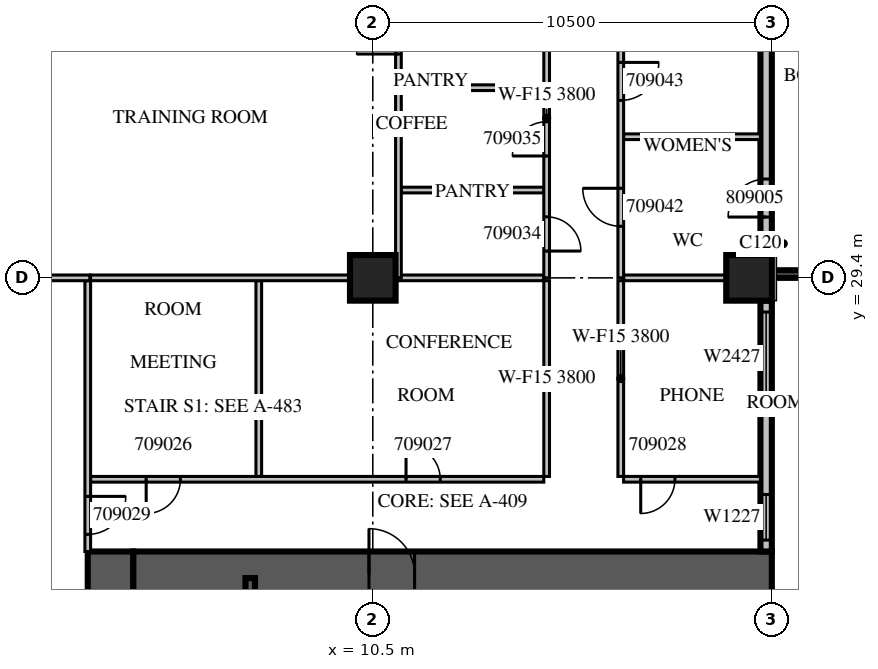
"""IFC4 building model, lengths in metres.
Left out: names, types, materials, properties, quantities, classifications, styles, units other than length and angle.
Written with IfcOpenShell. Run it as: python <this file> out.ifc"""

import sys

from ifc_helpers import new_model, si_unit, direction, frame, frame_2d, origin, origin_2d, place, context, subcontext, project, spatial, rectangle, extrude, source, transform, mapped, element, fill, save


model = new_model("IFC4")
c1 = context("Model", 3, precision=1e-05, world=origin(), true_north=direction((0.0, 1.0)))
c2 = subcontext(c1, "Body", "Model", "MODEL_VIEW")
j1 = project(units=[si_unit("LENGTHUNIT", "METRE"), si_unit("PLANEANGLEUNIT", "RADIAN")], contexts=[c1])
p1 = place(None, origin())
s1 = spatial("IfcSite", under=j1, at=p1, CompositionType="ELEMENT")
p2 = place(p1, origin())
s2 = spatial("IfcBuilding", under=s1, at=p2, CompositionType="ELEMENT")
p3 = place(p2, frame((0.0, 0.0, 48.9)))
s3 = spatial("IfcBuildingStorey", under=s2, at=p3, CompositionType="ELEMENT", Elevation=48.9)
m1 = source(origin(), c2, "Body", "SweptSolid", [
    extrude(rectangle(XDim=1.2, YDim=1.2, at=origin_2d()), origin(), (0.0, 0.0, 1.0), 4.2),
])
for number, where, z_axis, x_axis in (
    (1, (10.5, 29.4, 0.0), (0.0, 0.0, 1.0), (1.0, 0.0, 0.0)),
    (2, (20.4, 29.4, 0.0), (0.0, 0.0, 1.0), (1.0, 0.0, 0.0)),
):
    element("IfcColumn", number, at=place(p3, frame(where, z_axis=z_axis, x_axis=x_axis)), inside=s3, PredefinedType="COLUMN", context=c2, shape_type="MappedRepresentation", body=[
        mapped(m1, transform((0.0, 0.0, 0.0), scale=1.0)),
    ])
m2 = source(origin(), c2, "Body", "SweptSolid", [
    extrude(rectangle(XDim=18.0, YDim=1.2, at=frame_2d((9.0, 0.0))), origin(), (0.0, 0.0, 1.0), 4.2),
])
p4 = place(p3, frame((3.6, 4.2, 0.0), z_axis=(0.0, 0.0, 1.0), x_axis=(0.0, 1.0, 0.0)))
e3 = element("IfcWall", 3, at=p4, inside=s3, PredefinedType="SHEAR", context=c2, shape_type="MappedRepresentation", body=[
    mapped(m2, transform((0.0, 0.0, 0.0), scale=1.0)),
])
m3 = source(origin(), c2, "Body", "SweptSolid", [
    extrude(rectangle(XDim=2.2, YDim=2.1, at=frame_2d((1.1, 1.05))), frame((0.0, 0.61, 0.0), z_axis=(0.0, -1.0, 0.0), x_axis=(1.0, 0.0, 0.0)), (0.0, 0.0, 1.0), 1.22),
])
p5 = place(p4, frame((4.2, 0.0, 0.0)))
e4 = element("IfcOpeningElement", 4, at=p5, cuts=e3, PredefinedType="OPENING", context=c2, shape_type="MappedRepresentation", body=[
    mapped(m3, transform((0.0, 0.0, 0.0), scale=1.0)),
])
m4 = source(origin(), c2, "Body", "SweptSolid", [
    extrude(rectangle(XDim=16.8, YDim=1.2, at=frame_2d((8.4, 0.0))), origin(), (0.0, 0.0, 1.0), 4.2),
])
p6 = place(p3, frame((4.2, 21.6, 0.0), z_axis=(0.0, 0.0, 1.0), x_axis=(1.0, 0.0, 0.0)))
e5 = element("IfcWall", 5, at=p6, inside=s3, PredefinedType="SHEAR", context=c2, shape_type="MappedRepresentation", body=[
    mapped(m4, transform((0.0, 0.0, 0.0), scale=1.0)),
])
m5 = source(origin(), c2, "Body", "SweptSolid", [
    extrude(rectangle(XDim=1.2, YDim=2.1, at=frame_2d((0.6, 1.05))), frame((0.0, 0.61, 0.0), z_axis=(0.0, -1.0, 0.0), x_axis=(1.0, 0.0, 0.0)), (0.0, 0.0, 1.0), 1.22),
])
p7 = place(p6, frame((6.2, 0.0, 0.0)))
e6 = element("IfcOpeningElement", 6, at=p7, cuts=e5, PredefinedType="OPENING", context=c2, shape_type="MappedRepresentation", body=[
    mapped(m5, transform((0.0, 0.0, 0.0), scale=1.0)),
])
m6 = source(origin(), c2, "Body", "SweptSolid", [
    extrude(rectangle(XDim=6.6, YDim=0.3, at=frame_2d((3.3, 0.0))), origin(), (0.0, 0.0, 1.0), 3.8),
])
p8 = place(p3, frame((20.85, 22.2, 0.0), z_axis=(0.0, 0.0, 1.0), x_axis=(0.0, 1.0, 0.0)))
e7 = element("IfcWall", 7, at=p8, inside=s3, PredefinedType="STANDARD", context=c2, shape_type="MappedRepresentation", body=[
    mapped(m6, transform((0.0, 0.0, 0.0), scale=1.0)),
])
m7 = source(origin(), c2, "Body", "SweptSolid", [
    extrude(rectangle(XDim=1.2, YDim=2.7, at=frame_2d((0.6, 1.35))), frame((0.0, 0.16, 0.0), z_axis=(0.0, -1.0, 0.0), x_axis=(1.0, 0.0, 0.0)), (0.0, 0.0, 1.0), 0.32),
])
p9 = place(p8, frame((0.3, 0.0, 0.6)))
e8 = element("IfcOpeningElement", 8, at=p9, cuts=e7, PredefinedType="OPENING", context=c2, shape_type="MappedRepresentation", body=[
    mapped(m7, transform((0.0, 0.0, 0.0), scale=1.0)),
])
m8 = source(origin(), c2, "Body", "SweptSolid", [
    extrude(rectangle(XDim=2.4, YDim=2.7, at=frame_2d((1.2, 1.35))), frame((0.0, 0.16, 0.0), z_axis=(0.0, -1.0, 0.0), x_axis=(1.0, 0.0, 0.0)), (0.0, 0.0, 1.0), 0.32),
])
p10 = place(p8, frame((3.9, 0.0, 0.6)))
e9 = element("IfcOpeningElement", 9, at=p10, cuts=e7, PredefinedType="OPENING", context=c2, shape_type="MappedRepresentation", body=[
    mapped(m8, transform((0.0, 0.0, 0.0), scale=1.0)),
])
m9 = source(origin(), c2, "Body", "SweptSolid", [
    extrude(rectangle(XDim=7.2, YDim=0.3, at=frame_2d((3.6, 0.0))), origin(), (0.0, 0.0, 1.0), 3.8),
])
p11 = place(p3, frame((20.85, 30.0, 0.0), z_axis=(0.0, 0.0, 1.0), x_axis=(0.0, 1.0, 0.0)))
e10 = element("IfcWall", 10, at=p11, inside=s3, PredefinedType="STANDARD", context=c2, shape_type="MappedRepresentation", body=[
    mapped(m9, transform((0.0, 0.0, 0.0), scale=1.0)),
])
m10 = source(origin(), c2, "Body", "SweptSolid", [
    extrude(rectangle(XDim=1.0, YDim=2.1, at=frame_2d((0.5, 1.05))), frame((0.0, 0.16, 0.0), z_axis=(0.0, -1.0, 0.0), x_axis=(1.0, 0.0, 0.0)), (0.0, 0.0, 1.0), 0.32),
])
p12 = place(p11, frame((1.0, 0.0, 0.0)))
e11 = element("IfcOpeningElement", 11, at=p12, cuts=e10, PredefinedType="OPENING", context=c2, shape_type="MappedRepresentation", body=[
    mapped(m10, transform((0.0, 0.0, 0.0), scale=1.0)),
])
m11 = source(origin(), c2, "Body", "SweptSolid", [
    extrude(rectangle(XDim=3.9, YDim=0.2, at=frame_2d((1.95, 0.0))), origin(), (0.0, 0.0, 1.0), 3.79),
])
p13 = place(p3, frame((21.0, 29.5, 0.0), z_axis=(0.0, 0.0, 1.0), x_axis=(1.0, 0.0, 0.0)))
e12 = element("IfcWall", 12, at=p13, inside=s3, PredefinedType="SOLIDWALL", context=c2, shape_type="MappedRepresentation", body=[
    mapped(m11, transform((0.0, 0.0, 0.0), scale=1.0)),
])
m12 = source(origin(), c2, "Body", "SweptSolid", [
    extrude(rectangle(XDim=2.4, YDim=2.7, at=frame_2d((1.2, 1.35))), frame((0.0, 0.11, 0.0), z_axis=(0.0, -1.0, 0.0), x_axis=(1.0, 0.0, 0.0)), (0.0, 0.0, 1.0), 0.22),
])
p14 = place(p13, frame((0.75, 0.0, 0.6)))
e13 = element("IfcOpeningElement", 13, at=p14, cuts=e12, PredefinedType="OPENING", context=c2, shape_type="MappedRepresentation", body=[
    mapped(m12, transform((0.0, 0.0, 0.0), scale=1.0)),
])
m13 = source(origin(), c2, "Body", "SweptSolid", [
    extrude(rectangle(XDim=6.6, YDim=0.25, at=frame_2d((3.3, 0.0))), origin(), (0.0, 0.0, 1.0), 3.8),
])
p15 = place(p3, frame((7.275, 14.9, 0.0), z_axis=(0.0, 0.0, 1.0), x_axis=(0.0, 1.0, 0.0)))
e14 = element("IfcWall", 14, at=p15, inside=s3, PredefinedType="SOLIDWALL", context=c2, shape_type="MappedRepresentation", body=[
    mapped(m13, transform((0.0, 0.0, 0.0), scale=1.0)),
])
m14 = source(origin(), c2, "Body", "SweptSolid", [
    extrude(rectangle(XDim=1.1, YDim=2.1, at=frame_2d((0.55, 1.05))), frame((0.0, 0.135, 0.0), z_axis=(0.0, -1.0, 0.0), x_axis=(1.0, 0.0, 0.0)), (0.0, 0.0, 1.0), 0.27),
])
p16 = place(p15, frame((0.15, 0.0, 0.0)))
e15 = element("IfcOpeningElement", 15, at=p16, cuts=e14, PredefinedType="OPENING", context=c2, shape_type="MappedRepresentation", body=[
    mapped(m14, transform((0.0, 0.0, 0.0), scale=1.0)),
])
m15 = source(origin(), c2, "Body", "SweptSolid", [
    extrude(rectangle(XDim=11.925, YDim=0.15, at=frame_2d((5.963, 0.0))), origin(), (0.0, 0.0, 1.0), 3.8),
])
p17 = place(p3, frame((3.075, 24.1, 0.0), z_axis=(0.0, 0.0, 1.0), x_axis=(1.0, 0.0, 0.0)))
e16 = element("IfcWall", 16, at=p17, inside=s3, PredefinedType="PARTITIONING", context=c2, shape_type="MappedRepresentation", body=[
    mapped(m15, transform((0.0, 0.0, 0.0), scale=1.0)),
])
m16 = source(origin(), c2, "Body", "SweptSolid", [
    extrude(rectangle(XDim=0.9, YDim=2.1, at=frame_2d((0.45, 1.05))), frame((0.0, 0.085, 0.0), z_axis=(0.0, -1.0, 0.0), x_axis=(1.0, 0.0, 0.0)), (0.0, 0.0, 1.0), 0.17),
])
p18 = place(p17, frame((1.462, 0.0, 0.0)))
e17 = element("IfcOpeningElement", 17, at=p18, cuts=e16, PredefinedType="OPENING", context=c2, shape_type="MappedRepresentation", body=[
    mapped(m16, transform((0.0, 0.0, 0.0), scale=1.0)),
])
p19 = place(p17, frame((8.3, 0.0, 0.0)))
e18 = element("IfcOpeningElement", 18, at=p19, cuts=e16, PredefinedType="OPENING", context=c2, shape_type="MappedRepresentation", body=[
    mapped(m16, transform((0.0, 0.0, 0.0), scale=1.0)),
])
m17 = source(origin(), c2, "Body", "SweptSolid", [
    extrude(rectangle(XDim=3.6, YDim=0.15, at=frame_2d((1.8, 0.0))), origin(), (0.0, 0.0, 1.0), 3.8),
])
p20 = place(p3, frame((17.1, 24.1, 0.0), z_axis=(0.0, 0.0, 1.0), x_axis=(1.0, 0.0, 0.0)))
e19 = element("IfcWall", 19, at=p20, inside=s3, PredefinedType="PARTITIONING", context=c2, shape_type="MappedRepresentation", body=[
    mapped(m17, transform((0.0, 0.0, 0.0), scale=1.0)),
])
p21 = place(p20, frame((0.45, 0.0, 0.0)))
e20 = element("IfcOpeningElement", 20, at=p21, cuts=e19, PredefinedType="OPENING", context=c2, shape_type="MappedRepresentation", body=[
    mapped(m16, transform((0.0, 0.0, 0.0), scale=1.0)),
])
m18 = source(origin(), c2, "Body", "SweptSolid", [
    extrude(rectangle(XDim=5.15, YDim=0.15, at=frame_2d((2.575, 0.0))), origin(), (0.0, 0.0, 1.0), 3.8),
])
for number, where, z_axis, x_axis in (
    (21, (7.5, 24.175, 0.0), (0.0, 0.0, 1.0), (0.0, 1.0, 0.0)),
    (22, (15.075, 24.175, 0.0), (0.0, 0.0, 1.0), (0.0, 1.0, 0.0)),
    (23, (17.025, 29.325, 0.0), (0.0, 0.0, 1.0), (0.0, -1.0, 0.0)),
):
    element("IfcWall", number, at=place(p3, frame(where, z_axis=z_axis, x_axis=x_axis)), inside=s3, PredefinedType="PARTITIONING", context=c2, shape_type="MappedRepresentation", body=[
        mapped(m18, transform((0.0, 0.0, 0.0), scale=1.0)),
    ])
m19 = source(origin(), c2, "Body", "SweptSolid", [
    extrude(rectangle(XDim=6.826, YDim=0.15, at=frame_2d((3.413, 0.0))), origin(), (0.0, 0.0, 1.0), 3.8),
])
p22 = place(p3, frame((9.901, 29.4, 0.0), z_axis=(0.0, 0.0, 1.0), x_axis=(-1.0, 0.0, 0.0)))
e24 = element("IfcWall", 24, at=p22, inside=s3, PredefinedType="PARTITIONING", context=c2, shape_type="MappedRepresentation", body=[
    mapped(m19, transform((0.0, 0.0, 0.0), scale=1.0)),
])
m20 = source(origin(), c2, "Body", "SweptSolid", [
    extrude(rectangle(XDim=3.901, YDim=0.15, at=frame_2d((1.95, 0.0))), origin(), (0.0, 0.0, 1.0), 3.8),
])
p23 = place(p3, frame((15.0, 29.4, 0.0), z_axis=(0.0, 0.0, 1.0), x_axis=(-1.0, 0.0, 0.0)))
e25 = element("IfcWall", 25, at=p23, inside=s3, PredefinedType="PARTITIONING", context=c2, shape_type="MappedRepresentation", body=[
    mapped(m20, transform((0.0, 0.0, 0.0), scale=1.0)),
])
m21 = source(origin(), c2, "Body", "SweptSolid", [
    extrude(rectangle(XDim=2.701, YDim=0.15, at=frame_2d((1.351, 0.0))), origin(), (0.0, 0.0, 1.0), 3.8),
])
p24 = place(p3, frame((19.801, 29.4, 0.0), z_axis=(0.0, 0.0, 1.0), x_axis=(-1.0, 0.0, 0.0)))
e26 = element("IfcWall", 26, at=p24, inside=s3, PredefinedType="PARTITIONING", context=c2, shape_type="MappedRepresentation", body=[
    mapped(m21, transform((0.0, 0.0, 0.0), scale=1.0)),
])
m22 = source(origin(), c2, "Body", "SweptSolid", [
    extrude(rectangle(XDim=7.125, YDim=0.15, at=frame_2d((3.562, 0.0))), origin(), (0.0, 0.0, 1.0), 3.8),
])
p25 = place(p3, frame((3.0, 29.325, 0.0), z_axis=(0.0, 0.0, 1.0), x_axis=(0.0, -1.0, 0.0)))
e27 = element("IfcWall", 27, at=p25, inside=s3, PredefinedType="PARTITIONING", context=c2, shape_type="MappedRepresentation", body=[
    mapped(m22, transform((0.0, 0.0, 0.0), scale=1.0)),
])
m23 = source(origin(), c2, "Body", "SweptSolid", [
    extrude(rectangle(XDim=1.0, YDim=2.1, at=frame_2d((0.5, 1.05))), frame((0.0, 0.085, 0.0), z_axis=(0.0, -1.0, 0.0), x_axis=(1.0, 0.0, 0.0)), (0.0, 0.0, 1.0), 0.17),
])
p26 = place(p25, frame((5.675, 0.0, 0.0)))
e28 = element("IfcOpeningElement", 28, at=p26, cuts=e27, PredefinedType="OPENING", context=c2, shape_type="MappedRepresentation", body=[
    mapped(m23, transform((0.0, 0.0, 0.0), scale=1.0)),
])
m24 = source(origin(), c2, "Body", "SweptSolid", [
    extrude(rectangle(XDim=3.75, YDim=0.15, at=frame_2d((1.875, 0.0))), origin(), (0.0, 0.0, 1.0), 3.8),
])
for number, where, z_axis, x_axis in (
    (29, (15.0, 31.71, 0.0), (0.0, 0.0, 1.0), (-1.0, 0.0, 0.0)),
    (30, (15.0, 34.403, 0.0), (0.0, 0.0, 1.0), (-1.0, 0.0, 0.0)),
):
    element("IfcWall", number, at=place(p3, frame(where, z_axis=z_axis, x_axis=x_axis)), inside=s3, PredefinedType="PARTITIONING", context=c2, shape_type="MappedRepresentation", body=[
        mapped(m24, transform((0.0, 0.0, 0.0), scale=1.0)),
    ])
m25 = source(origin(), c2, "Body", "SweptSolid", [
    extrude(rectangle(XDim=1.856, YDim=0.15, at=frame_2d((0.928, 0.0))), origin(), (0.0, 0.0, 1.0), 3.8),
])
p27 = place(p3, frame((3.055, 29.4, 0.0), z_axis=(0.0, 0.0, 1.0), x_axis=(-1.0, 0.0, 0.0)))
e31 = element("IfcWall", 31, at=p27, inside=s3, PredefinedType="PARTITIONING", context=c2, shape_type="MappedRepresentation", body=[
    mapped(m25, transform((0.0, 0.0, 0.0), scale=1.0)),
])
m26 = source(origin(), c2, "Body", "SweptSolid", [
    extrude(rectangle(XDim=8.4, YDim=0.15, at=frame_2d((4.2, 0.0))), origin(), (0.0, 0.0, 1.0), 3.8),
])
p28 = place(p3, frame((11.175, 29.4, 0.0), z_axis=(0.0, 0.0, 1.0), x_axis=(0.0, 1.0, 0.0)))
e32 = element("IfcWall", 32, at=p28, inside=s3, PredefinedType="PARTITIONING", context=c2, shape_type="MappedRepresentation", body=[
    mapped(m26, transform((0.0, 0.0, 0.0), scale=1.0)),
])
m27 = source(origin(), c2, "Body", "SweptSolid", [
    extrude(rectangle(XDim=1.1, YDim=2.1, at=frame_2d((0.55, 1.05))), frame((0.0, 0.085, 0.0), z_axis=(0.0, -1.0, 0.0), x_axis=(1.0, 0.0, 0.0)), (0.0, 0.0, 1.0), 0.17),
])
p29 = place(p28, frame((5.889, 0.0, 0.0)))
e33 = element("IfcOpeningElement", 33, at=p29, cuts=e32, PredefinedType="OPENING", context=c2, shape_type="MappedRepresentation", body=[
    mapped(m27, transform((0.0, 0.0, 0.0), scale=1.0)),
])
p30 = place(p3, frame((17.1, 33.113, 0.0), z_axis=(0.0, 0.0, 1.0), x_axis=(1.0, 0.0, 0.0)))
e34 = element("IfcWall", 34, at=p30, inside=s3, PredefinedType="PARTITIONING", context=c2, shape_type="MappedRepresentation", body=[
    mapped(m17, transform((0.0, 0.0, 0.0), scale=1.0)),
])
p31 = place(p3, frame((15.075, 29.4, 0.0), z_axis=(0.0, 0.0, 1.0), x_axis=(0.0, 1.0, 0.0)))
e35 = element("IfcWall", 35, at=p31, inside=s3, PredefinedType="PARTITIONING", context=c2, shape_type="MappedRepresentation", body=[
    mapped(m26, transform((0.0, 0.0, 0.0), scale=1.0)),
])
p32 = place(p31, frame((6.152, 0.0, 0.0)))
e36 = element("IfcOpeningElement", 36, at=p32, cuts=e35, PredefinedType="OPENING", context=c2, shape_type="MappedRepresentation", body=[
    mapped(m27, transform((0.0, 0.0, 0.0), scale=1.0)),
])
p33 = place(p31, frame((0.705, 0.0, 0.0)))
e37 = element("IfcOpeningElement", 37, at=p33, cuts=e35, PredefinedType="OPENING", context=c2, shape_type="MappedRepresentation", body=[
    mapped(m16, transform((0.0, 0.0, 0.0), scale=1.0)),
])
p34 = place(p31, frame((3.207, 0.0, 0.0)))
e38 = element("IfcOpeningElement", 38, at=p34, cuts=e35, PredefinedType="OPENING", context=c2, shape_type="MappedRepresentation", body=[
    mapped(m16, transform((0.0, 0.0, 0.0), scale=1.0)),
])
p35 = place(p3, frame((17.025, 61.02, 0.0), z_axis=(0.0, 0.0, 1.0), x_axis=(0.0, -1.0, 0.0)))
e39 = element("IfcWall", 39, at=p35, inside=s3, PredefinedType="PARTITIONING", context=c2, shape_type="SweptSolid", body=[
    extrude(rectangle(XDim=31.62, YDim=0.15, at=frame_2d((15.81, 0.0))), origin(), (0.0, 0.0, 1.0), 3.8),
])
p36 = place(p35, frame((29.263, 0.0, 0.0)))
e40 = element("IfcOpeningElement", 40, at=p36, cuts=e39, PredefinedType="OPENING", context=c2, shape_type="MappedRepresentation", body=[
    mapped(m23, transform((0.0, 0.0, 0.0), scale=1.0)),
])
p37 = place(p35, frame((25.951, 0.0, 0.0)))
e41 = element("IfcOpeningElement", 41, at=p37, cuts=e39, PredefinedType="OPENING", context=c2, shape_type="MappedRepresentation", body=[
    mapped(m23, transform((0.0, 0.0, 0.0), scale=1.0)),
])
p38 = place(p35, frame((23.608, 0.0, 0.0)))
e42 = element("IfcOpeningElement", 42, at=p38, cuts=e39, PredefinedType="OPENING", context=c2, shape_type="MappedRepresentation", body=[
    mapped(m23, transform((0.0, 0.0, 0.0), scale=1.0)),
])
p39 = place(p35, frame((20.863, 0.0, 0.0)))
e43 = element("IfcOpeningElement", 43, at=p39, cuts=e39, PredefinedType="OPENING", context=c2, shape_type="MappedRepresentation", body=[
    mapped(m23, transform((0.0, 0.0, 0.0), scale=1.0)),
])
p40 = place(p35, frame((17.551, 0.0, 0.0)))
e44 = element("IfcOpeningElement", 44, at=p40, cuts=e39, PredefinedType="OPENING", context=c2, shape_type="MappedRepresentation", body=[
    mapped(m23, transform((0.0, 0.0, 0.0), scale=1.0)),
])
p41 = place(p35, frame((15.208, 0.0, 0.0)))
e45 = element("IfcOpeningElement", 45, at=p41, cuts=e39, PredefinedType="OPENING", context=c2, shape_type="MappedRepresentation", body=[
    mapped(m23, transform((0.0, 0.0, 0.0), scale=1.0)),
])
p42 = place(p35, frame((12.677, 0.0, 0.0)))
e46 = element("IfcOpeningElement", 46, at=p42, cuts=e39, PredefinedType="OPENING", context=c2, shape_type="MappedRepresentation", body=[
    mapped(m16, transform((0.0, 0.0, 0.0), scale=1.0)),
])
p43 = place(p35, frame((9.737, 0.0, 0.0)))
e47 = element("IfcOpeningElement", 47, at=p43, cuts=e39, PredefinedType="OPENING", context=c2, shape_type="MappedRepresentation", body=[
    mapped(m16, transform((0.0, 0.0, 0.0), scale=1.0)),
])
p44 = place(p35, frame((6.236, 0.0, 0.0)))
e48 = element("IfcOpeningElement", 48, at=p44, cuts=e39, PredefinedType="OPENING", context=c2, shape_type="MappedRepresentation", body=[
    mapped(m16, transform((0.0, 0.0, 0.0), scale=1.0)),
])
p45 = place(p35, frame((1.729, 0.0, 0.0)))
e49 = element("IfcOpeningElement", 49, at=p45, cuts=e39, PredefinedType="OPENING", context=c2, shape_type="MappedRepresentation", body=[
    mapped(m16, transform((0.0, 0.0, 0.0), scale=1.0)),
])
m28 = source(origin(), c2, "Body", "SweptSolid", [
    extrude(rectangle(XDim=1.2, YDim=2.7, at=frame_2d((0.6, 1.35))), frame((0.0, 0.03, 0.0), z_axis=(0.0, -1.0, 0.0), x_axis=(1.0, 0.0, 0.0)), (0.0, 0.0, 1.0), 0.06),
])
p46 = place(p9, origin())
e50 = element("IfcWindow", 50, at=p46, inside=s3, PartitioningType="SINGLE_PANEL", PredefinedType="WINDOW", context=c2, shape_type="MappedRepresentation", body=[
    mapped(m28, transform((0.0, 0.0, 0.0), scale=1.0)),
])
fill(e8, e50)
m29 = source(origin(), c2, "Body", "SweptSolid", [
    extrude(rectangle(XDim=2.4, YDim=2.7, at=frame_2d((1.2, 1.35))), frame((0.0, 0.03, 0.0), z_axis=(0.0, -1.0, 0.0), x_axis=(1.0, 0.0, 0.0)), (0.0, 0.0, 1.0), 0.06),
])
p47 = place(p10, origin())
e51 = element("IfcWindow", 51, at=p47, inside=s3, PartitioningType="SINGLE_PANEL", PredefinedType="WINDOW", context=c2, shape_type="MappedRepresentation", body=[
    mapped(m29, transform((0.0, 0.0, 0.0), scale=1.0)),
])
fill(e9, e51)
m30 = source(origin(), c2, "Body", "SweptSolid", [
    extrude(rectangle(XDim=1.2, YDim=2.1, at=frame_2d((0.6, 1.05))), frame((0.0, 0.025, 0.0), z_axis=(0.0, -1.0, 0.0), x_axis=(1.0, 0.0, 0.0)), (0.0, 0.0, 1.0), 0.05),
])
p48 = place(p7, origin())
e52 = element("IfcDoor", 52, at=p48, inside=s3, OperationType="SINGLE_SWING_LEFT", PredefinedType="DOOR", context=c2, shape_type="MappedRepresentation", body=[
    mapped(m30, transform((0.0, 0.0, 0.0), scale=1.0)),
])
fill(e6, e52)
m31 = source(origin(), c2, "Body", "SweptSolid", [
    extrude(rectangle(XDim=0.9, YDim=2.1, at=frame_2d((0.45, 1.05))), frame((0.0, 0.025, 0.0), z_axis=(0.0, -1.0, 0.0), x_axis=(1.0, 0.0, 0.0)), (0.0, 0.0, 1.0), 0.05),
])
p49 = place(p18, origin())
e53 = element("IfcDoor", 53, at=p49, inside=s3, OperationType="SINGLE_SWING_RIGHT", PredefinedType="DOOR", context=c2, shape_type="MappedRepresentation", body=[
    mapped(m31, transform((0.0, 0.0, 0.0), scale=1.0)),
])
fill(e17, e53)
p50 = place(p19, origin())
e54 = element("IfcDoor", 54, at=p50, inside=s3, OperationType="SINGLE_SWING_LEFT", PredefinedType="DOOR", context=c2, shape_type="MappedRepresentation", body=[
    mapped(m31, transform((0.0, 0.0, 0.0), scale=1.0)),
])
fill(e18, e54)
p51 = place(p21, origin())
e55 = element("IfcDoor", 55, at=p51, inside=s3, OperationType="SINGLE_SWING_RIGHT", PredefinedType="DOOR", context=c2, shape_type="MappedRepresentation", body=[
    mapped(m31, transform((0.0, 0.0, 0.0), scale=1.0)),
])
fill(e20, e55)
m32 = source(origin(), c2, "Body", "SweptSolid", [
    extrude(rectangle(XDim=1.0, YDim=2.1, at=frame_2d((0.5, 1.05))), frame((0.0, 0.025, 0.0), z_axis=(0.0, -1.0, 0.0), x_axis=(1.0, 0.0, 0.0)), (0.0, 0.0, 1.0), 0.05),
])
p52 = place(p26, origin())
e56 = element("IfcDoor", 56, at=p52, inside=s3, OperationType="SINGLE_SWING_LEFT", PredefinedType="DOOR", context=c2, shape_type="MappedRepresentation", body=[
    mapped(m32, transform((0.0, 0.0, 0.0), scale=1.0)),
])
fill(e28, e56)
m33 = source(origin(), c2, "Body", "SweptSolid", [
    extrude(rectangle(XDim=1.1, YDim=2.1, at=frame_2d((0.55, 1.05))), frame((0.0, 0.025, 0.0), z_axis=(0.0, -1.0, 0.0), x_axis=(1.0, 0.0, 0.0)), (0.0, 0.0, 1.0), 0.05),
])
p53 = place(p29, origin())
e57 = element("IfcDoor", 57, at=p53, inside=s3, OperationType="SINGLE_SWING_LEFT", PredefinedType="DOOR", context=c2, shape_type="MappedRepresentation", body=[
    mapped(m33, transform((0.0, 0.0, 0.0), scale=1.0)),
])
fill(e33, e57)
p54 = place(p33, origin())
e58 = element("IfcDoor", 58, at=p54, inside=s3, OperationType="SINGLE_SWING_RIGHT", PredefinedType="DOOR", context=c2, shape_type="MappedRepresentation", body=[
    mapped(m31, transform((0.0, 0.0, 0.0), scale=1.0)),
])
fill(e37, e58)
p55 = place(p34, origin())
e59 = element("IfcDoor", 59, at=p55, inside=s3, OperationType="SINGLE_SWING_LEFT", PredefinedType="DOOR", context=c2, shape_type="MappedRepresentation", body=[
    mapped(m31, transform((0.0, 0.0, 0.0), scale=1.0)),
])
fill(e38, e59)
p56 = place(p36, origin())
e60 = element("IfcDoor", 60, at=p56, inside=s3, OperationType="SINGLE_SWING_RIGHT", PredefinedType="DOOR", context=c2, shape_type="MappedRepresentation", body=[
    mapped(m32, transform((0.0, 0.0, 0.0), scale=1.0)),
])
fill(e40, e60)
p57 = place(p37, origin())
e61 = element("IfcDoor", 61, at=p57, inside=s3, OperationType="SINGLE_SWING_LEFT", PredefinedType="DOOR", context=c2, shape_type="MappedRepresentation", body=[
    mapped(m32, transform((0.0, 0.0, 0.0), scale=1.0)),
])
fill(e41, e61)
p58 = place(p12, origin())
e62 = element("IfcDoor", 62, at=p58, inside=s3, OperationType="SINGLE_SWING_LEFT", PredefinedType="DOOR", context=c2, shape_type="MappedRepresentation", body=[
    mapped(m32, transform((0.0, 0.0, 0.0), scale=1.0)),
])
fill(e11, e62)
save(model, sys.argv[1])
